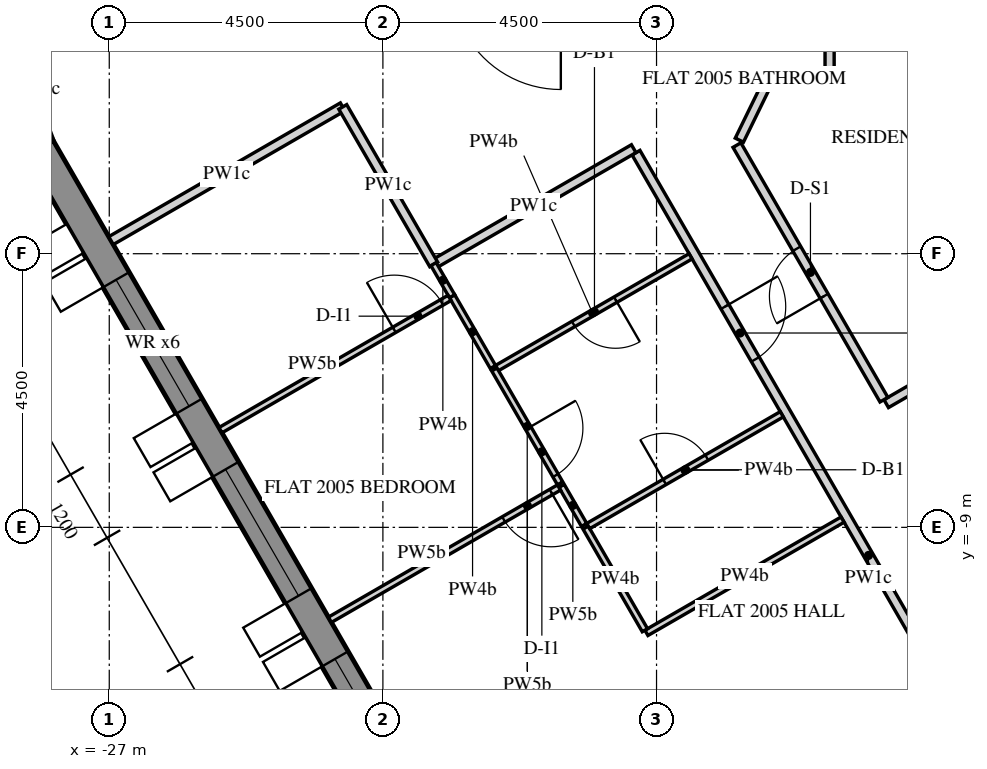
"""IFC4 building model, lengths in metres.
Left out: names, types, materials, properties, quantities, classifications, styles, units other than length and angle.
Written with IfcOpenShell. Run it as: python <this file> out.ifc"""

import sys

from ifc_helpers import new_model, si_unit, direction, frame, frame_2d, origin, place, context, subcontext, project, spatial, polyline, rectangle, outline, extrude, element, fill, save


model = new_model("IFC4")
c1 = context("Model", 3, precision=1e-05, world=origin(), true_north=direction((0.0, 1.0)))
c2 = subcontext(c1, "Body", "Model", "MODEL_VIEW")
j1 = project(units=[si_unit("LENGTHUNIT", "METRE"), si_unit("PLANEANGLEUNIT", "RADIAN")], contexts=[c1])
p1 = place(None, origin())
s1 = spatial("IfcSite", under=j1, at=p1, CompositionType="ELEMENT")
p2 = place(p1, origin())
s2 = spatial("IfcBuilding", under=s1, at=p2, CompositionType="ELEMENT")
p3 = place(p2, frame((0.0, 0.0, 256.2)))
s3 = spatial("IfcBuildingStorey", under=s2, at=p3, CompositionType="ELEMENT", Elevation=256.2)
p4 = place(p3, frame((-28.578, -1.606, 0.0), z_axis=(0.0, 0.0, 1.0), x_axis=(0.352838463023, -0.935684251771, 0.0)))
e1 = element("IfcWall", 1, at=p4, inside=s3, PredefinedType="SOLIDWALL", context=c2, shape_type="SweptSolid", body=[
    extrude(outline(polyline([(-0.041, -0.25), (1.237, -0.25), (1.196, 0.25), (0.041, 0.25), (-0.041, -0.25)])), origin(), (0.0, 0.0, 1.0), 3.75),
])
p5 = place(p3, frame((-28.149, -2.745, 0.0), z_axis=(0.0, 0.0, 1.0), x_axis=(0.500003737743, -0.866023245787, 0.0)))
e2 = element("IfcWall", 2, at=p5, inside=s3, PredefinedType="SOLIDWALL", context=c2, shape_type="SweptSolid", body=[
    extrude(outline(polyline([(-0.021, -0.25), (25.468, -0.25), (25.421, 0.25), (0.021, 0.25), (-0.021, -0.25)])), origin(), (0.0, 0.0, 1.0), 3.75),
])
p6 = place(p5, frame((2.522, 0.0, 0.6)))
e3 = element("IfcOpeningElement", 3, at=p6, cuts=e2, PredefinedType="OPENING", context=c2, shape_type="SweptSolid", body=[
    extrude(rectangle(XDim=2.4, YDim=2.7, at=frame_2d((1.2, 1.35))), frame((0.0, 0.26, 0.0), z_axis=(0.0, -1.0, 0.0), x_axis=(1.0, 0.0, 0.0)), (0.0, 0.0, 1.0), 0.52),
])
p7 = place(p5, frame((6.122, 0.0, 0.6)))
e4 = element("IfcOpeningElement", 4, at=p7, cuts=e2, PredefinedType="OPENING", context=c2, shape_type="SweptSolid", body=[
    extrude(rectangle(XDim=2.4, YDim=2.7, at=frame_2d((1.2, 1.35))), frame((0.0, 0.26, 0.0), z_axis=(0.0, -1.0, 0.0), x_axis=(1.0, 0.0, 0.0)), (0.0, 0.0, 1.0), 0.52),
])
p8 = place(p5, frame((9.722, 0.0, 0.6)))
e5 = element("IfcOpeningElement", 5, at=p8, cuts=e2, PredefinedType="OPENING", context=c2, shape_type="SweptSolid", body=[
    extrude(rectangle(XDim=2.4, YDim=2.7, at=frame_2d((1.2, 1.35))), frame((0.0, 0.26, 0.0), z_axis=(0.0, -1.0, 0.0), x_axis=(1.0, 0.0, 0.0)), (0.0, 0.0, 1.0), 0.52),
])
p9 = place(p5, frame((13.323, 0.0, 0.6)))
e6 = element("IfcOpeningElement", 6, at=p9, cuts=e2, PredefinedType="OPENING", context=c2, shape_type="SweptSolid", body=[
    extrude(rectangle(XDim=2.4, YDim=2.7, at=frame_2d((1.2, 1.35))), frame((0.0, 0.26, 0.0), z_axis=(0.0, -1.0, 0.0), x_axis=(1.0, 0.0, 0.0)), (0.0, 0.0, 1.0), 0.52),
])
p10 = place(p5, frame((16.922, 0.0, 0.6)))
e7 = element("IfcOpeningElement", 7, at=p10, cuts=e2, PredefinedType="OPENING", context=c2, shape_type="SweptSolid", body=[
    extrude(rectangle(XDim=2.4, YDim=2.7, at=frame_2d((1.2, 1.35))), frame((0.0, 0.26, 0.0), z_axis=(0.0, -1.0, 0.0), x_axis=(1.0, 0.0, 0.0)), (0.0, 0.0, 1.0), 0.52),
])
p11 = place(p5, frame((20.522, 0.0, 0.6)))
e8 = element("IfcOpeningElement", 8, at=p11, cuts=e2, PredefinedType="OPENING", context=c2, shape_type="SweptSolid", body=[
    extrude(rectangle(XDim=2.4, YDim=2.7, at=frame_2d((1.2, 1.35))), frame((0.0, 0.26, 0.0), z_axis=(0.0, -1.0, 0.0), x_axis=(1.0, 0.0, 0.0)), (0.0, 0.0, 1.0), 0.52),
])
p12 = place(p3, frame((-18.338, -2.838, 0.0), z_axis=(0.0, 0.0, 1.0), x_axis=(0.499999693481, -0.866025580753, 0.0)))
e9 = element("IfcWall", 9, at=p12, inside=s3, PredefinedType="PARTITIONING", context=c2, shape_type="SweptSolid", body=[
    extrude(rectangle(XDim=15.296, YDim=0.15, at=frame_2d((7.648, 0.0))), origin(), (0.0, 0.0, 1.0), 2.823),
])
p13 = place(p12, frame((2.925, 0.0, 0.0)))
e10 = element("IfcOpeningElement", 10, at=p13, cuts=e9, PredefinedType="OPENING", context=c2, shape_type="SweptSolid", body=[
    extrude(rectangle(XDim=1.0, YDim=2.1, at=frame_2d((0.5, 1.05))), frame((0.0, 0.085, 0.0), z_axis=(0.0, -1.0, 0.0), x_axis=(1.0, 0.0, 0.0)), (0.0, 0.0, 1.0), 0.17),
])
p14 = place(p12, frame((14.136, 0.0, 0.0)))
e11 = element("IfcOpeningElement", 11, at=p14, cuts=e9, PredefinedType="OPENING", context=c2, shape_type="SweptSolid", body=[
    extrude(rectangle(XDim=1.0, YDim=2.1, at=frame_2d((0.5, 1.05))), frame((0.0, 0.085, 0.0), z_axis=(0.0, -1.0, 0.0), x_axis=(1.0, 0.0, 0.0)), (0.0, 0.0, 1.0), 0.17),
])
p15 = place(p3, frame((-21.666, -4.673, 0.0), z_axis=(0.0, 0.0, 1.0), x_axis=(0.86601654697, 0.500015340139, 0.0)))
e12 = element("IfcWall", 12, at=p15, inside=s3, PredefinedType="PARTITIONING", context=c2, shape_type="SweptSolid", body=[
    extrude(rectangle(XDim=3.8, YDim=0.15, at=frame_2d((1.9, 0.0))), origin(), (0.0, 0.0, 1.0), 2.823),
])
p16 = place(p3, frame((-26.971, -4.284, 0.0), z_axis=(0.0, 0.0, 1.0), x_axis=(0.866010893236, 0.500025132165, 0.0)))
e13 = element("IfcWall", 13, at=p16, inside=s3, PredefinedType="PARTITIONING", context=c2, shape_type="SweptSolid", body=[
    extrude(rectangle(XDim=4.399, YDim=0.15, at=frame_2d((2.199, 0.0))), origin(), (0.0, 0.0, 1.0), 2.823),
])
p17 = place(p3, frame((-23.16, -2.085, 0.0), z_axis=(0.0, 0.0, 1.0), x_axis=(0.499983857782, -0.866034723298, 0.0)))
e14 = element("IfcWall", 14, at=p17, inside=s3, PredefinedType="PARTITIONING", context=c2, shape_type="SweptSolid", body=[
    extrude(rectangle(XDim=2.991, YDim=0.15, at=frame_2d((1.496, 0.0))), origin(), (0.0, 0.0, 1.0), 2.823),
])
p18 = place(p3, frame((-10.066, -4.566, 0.0), z_axis=(0.0, 0.0, 1.0), x_axis=(-0.866037363387, -0.499979284789, 0.0)))
e15 = element("IfcWall", 15, at=p18, inside=s3, PredefinedType="PARTITIONING", context=c2, shape_type="SweptSolid", body=[
    extrude(rectangle(XDim=4.8, YDim=0.15, at=frame_2d((2.4, 0.0))), origin(), (0.0, 0.0, 1.0), 2.823),
])
p19 = place(p3, frame((-14.26, -6.901, 0.0), z_axis=(0.0, 0.0, 1.0), x_axis=(-0.499978899972, 0.866037585549, 0.0)))
e16 = element("IfcWall", 16, at=p19, inside=s3, PredefinedType="PARTITIONING", context=c2, shape_type="SweptSolid", body=[
    extrude(rectangle(XDim=4.835, YDim=0.15, at=frame_2d((2.417, 0.0))), origin(), (0.0, 0.0, 1.0), 2.823),
])
p20 = place(p19, frame((1.967, 0.0, 0.0)))
e17 = element("IfcOpeningElement", 17, at=p20, cuts=e16, PredefinedType="OPENING", context=c2, shape_type="SweptSolid", body=[
    extrude(rectangle(XDim=0.9, YDim=2.1, at=frame_2d((0.45, 1.05))), frame((0.0, 0.085, 0.0), z_axis=(0.0, -1.0, 0.0), x_axis=(1.0, 0.0, 0.0)), (0.0, 0.0, 1.0), 0.17),
])
p21 = place(p3, frame((-16.638, -2.632, 0.0), z_axis=(0.0, 0.0, 1.0), x_axis=(0.438437541994, 0.898761660158, 0.0)))
e18 = element("IfcWall", 18, at=p21, inside=s3, PredefinedType="PARTITIONING", context=c2, shape_type="SweptSolid", body=[
    extrude(rectangle(XDim=1.037, YDim=0.15, at=frame_2d((0.519, 0.0))), origin(), (0.0, 0.0, 1.0), 2.823),
])
p22 = place(p3, frame((-16.1, -1.7, 0.0), z_axis=(0.0, 0.0, 1.0), x_axis=(1.0, 0.0, 0.0)))
e19 = element("IfcWall", 19, at=p22, inside=s3, PredefinedType="PARTITIONING", context=c2, shape_type="SweptSolid", body=[
    extrude(rectangle(XDim=0.946, YDim=0.15, at=frame_2d((0.473, 0.0))), origin(), (0.0, 0.0, 1.0), 2.823),
])
p23 = place(p3, frame((-15.154, -1.625, 0.0), z_axis=(0.0, 0.0, 1.0), x_axis=(0.0, 1.0, 0.0)))
e20 = element("IfcWall", 20, at=p23, inside=s3, PredefinedType="PARTITIONING", context=c2, shape_type="SweptSolid", body=[
    extrude(rectangle(XDim=1.425, YDim=0.15, at=frame_2d((0.712, 0.0))), origin(), (0.0, 0.0, 1.0), 2.823),
])
p24 = place(p3, frame((-19.191, -8.96, 0.0), z_axis=(0.0, 0.0, 1.0), x_axis=(-0.500036104519, 0.866004557827, 0.0)))
e21 = element("IfcWall", 21, at=p24, inside=s3, PredefinedType="PARTITIONING", context=c2, shape_type="SweptSolid", body=[
    extrude(rectangle(XDim=0.741, YDim=0.1, at=frame_2d((0.371, 0.0))), origin(), (0.0, 0.0, 1.0), 2.823),
])
p25 = place(p3, frame((-19.604, -8.345, 0.0), z_axis=(0.0, 0.0, 1.0), x_axis=(-0.866027639635, -0.499996127374, 0.0)))
e22 = element("IfcWall", 22, at=p25, inside=s3, PredefinedType="PARTITIONING", context=c2, shape_type="SweptSolid", body=[
    extrude(rectangle(XDim=4.35, YDim=0.1, at=frame_2d((2.175, 0.0))), origin(), (0.0, 0.0, 1.0), 2.823),
])
p26 = place(p25, frame((0.15, 0.0, 0.0)))
e23 = element("IfcOpeningElement", 23, at=p26, cuts=e22, PredefinedType="OPENING", context=c2, shape_type="SweptSolid", body=[
    extrude(rectangle(XDim=0.9, YDim=2.1, at=frame_2d((0.45, 1.05))), frame((0.0, 0.06, 0.0), z_axis=(0.0, -1.0, 0.0), x_axis=(1.0, 0.0, 0.0)), (0.0, 0.0, 1.0), 0.12),
])
p27 = place(p3, frame((-14.94, -8.873, 0.0), z_axis=(0.0, 0.0, 1.0), x_axis=(-0.866056803351, -0.499945610411, 0.0)))
e24 = element("IfcWall", 24, at=p27, inside=s3, PredefinedType="PARTITIONING", context=c2, shape_type="SweptSolid", body=[
    extrude(rectangle(XDim=3.725, YDim=0.1, at=frame_2d((1.863, 0.0))), origin(), (0.0, 0.0, 1.0), 2.823),
])
p28 = place(p3, frame((-18.191, -10.692, 0.0), z_axis=(0.0, 0.0, 1.0), x_axis=(-0.500043961785, 0.866000020948, 0.0)))
e25 = element("IfcWall", 25, at=p28, inside=s3, PredefinedType="PARTITIONING", context=c2, shape_type="SweptSolid", body=[
    extrude(rectangle(XDim=1.95, YDim=0.1, at=frame_2d((0.975, 0.0))), origin(), (0.0, 0.0, 1.0), 2.823),
])
p29 = place(p3, frame((-17.44, -4.542, 0.0), z_axis=(0.0, 0.0, 1.0), x_axis=(-0.866028424924, -0.499994767197, 0.0)))
e26 = element("IfcWall", 26, at=p29, inside=s3, PredefinedType="PARTITIONING", context=c2, shape_type="SweptSolid", body=[
    extrude(rectangle(XDim=3.725, YDim=0.1, at=frame_2d((1.863, 0.0))), origin(), (0.0, 0.0, 1.0), 2.823),
])
p30 = place(p29, frame((1.425, 0.0, 0.0)))
e27 = element("IfcOpeningElement", 27, at=p30, cuts=e26, PredefinedType="OPENING", context=c2, shape_type="SweptSolid", body=[
    extrude(rectangle(XDim=0.8, YDim=2.1, at=frame_2d((0.4, 1.05))), frame((0.0, 0.06, 0.0), z_axis=(0.0, -1.0, 0.0), x_axis=(1.0, 0.0, 0.0)), (0.0, 0.0, 1.0), 0.12),
])
p31 = place(p3, frame((-20.667, -6.403, 0.0), z_axis=(0.0, 0.0, 1.0), x_axis=(0.499999270699, -0.866025824846, 0.0)))
e28 = element("IfcWall", 28, at=p31, inside=s3, PredefinedType="PARTITIONING", context=c2, shape_type="SweptSolid", body=[
    extrude(rectangle(XDim=2.163, YDim=0.1, at=frame_2d((1.082, 0.0))), origin(), (0.0, 0.0, 1.0), 2.823),
])
p32 = place(p31, frame((1.113, 0.0, 0.0)))
e29 = element("IfcOpeningElement", 29, at=p32, cuts=e28, PredefinedType="OPENING", context=c2, shape_type="SweptSolid", body=[
    extrude(rectangle(XDim=0.9, YDim=2.1, at=frame_2d((0.45, 1.05))), frame((0.0, 0.06, 0.0), z_axis=(0.0, -1.0, 0.0), x_axis=(1.0, 0.0, 0.0)), (0.0, 0.0, 1.0), 0.12),
])
p33 = place(p3, frame((-19.123, -8.978, 0.0), z_axis=(0.0, 0.0, 1.0), x_axis=(0.866006363297, 0.500032977642, 0.0)))
e30 = element("IfcWall", 30, at=p33, inside=s3, PredefinedType="PARTITIONING", context=c2, shape_type="SweptSolid", body=[
    extrude(rectangle(XDim=3.675, YDim=0.1, at=frame_2d((1.837, 0.0))), origin(), (0.0, 0.0, 1.0), 2.823),
])
p34 = place(p33, frame((1.45, 0.0, 0.0)))
e31 = element("IfcOpeningElement", 31, at=p34, cuts=e30, PredefinedType="OPENING", context=c2, shape_type="SweptSolid", body=[
    extrude(rectangle(XDim=0.8, YDim=2.1, at=frame_2d((0.4, 1.05))), frame((0.0, 0.06, 0.0), z_axis=(0.0, -1.0, 0.0), x_axis=(1.0, 0.0, 0.0)), (0.0, 0.0, 1.0), 0.12),
])
p35 = place(p3, frame((-21.667, -4.671, 0.0), z_axis=(0.0, 0.0, 1.0), x_axis=(0.499952348839, -0.866052913447, 0.0)))
e32 = element("IfcWall", 32, at=p35, inside=s3, PredefinedType="PARTITIONING", context=c2, shape_type="SweptSolid", body=[
    extrude(rectangle(XDim=0.613, YDim=0.1, at=frame_2d((0.306, 0.0))), origin(), (0.0, 0.0, 1.0), 2.823),
])
p36 = place(p3, frame((-21.361, -5.202, 0.0), z_axis=(0.0, 0.0, 1.0), x_axis=(0.500074377092, -0.865982457891, 0.0)))
e33 = element("IfcWall", 33, at=p36, inside=s3, PredefinedType="PARTITIONING", context=c2, shape_type="SweptSolid", body=[
    extrude(rectangle(XDim=1.341, YDim=0.1, at=frame_2d((0.67, 0.0))), origin(), (0.0, 0.0, 1.0), 2.823),
])
p37 = place(p3, frame((-25.171, -7.402, 0.0), z_axis=(0.0, 0.0, 1.0), x_axis=(0.866013608182, 0.500020430026, 0.0)))
e34 = element("IfcWall", 34, at=p37, inside=s3, PredefinedType="PARTITIONING", context=c2, shape_type="SweptSolid", body=[
    extrude(rectangle(XDim=4.35, YDim=0.1, at=frame_2d((2.175, 0.0))), origin(), (0.0, 0.0, 1.0), 2.823),
])
p38 = place(p37, frame((3.3, 0.0, 0.0)))
e35 = element("IfcOpeningElement", 35, at=p38, cuts=e34, PredefinedType="OPENING", context=c2, shape_type="SweptSolid", body=[
    extrude(rectangle(XDim=0.9, YDim=2.1, at=frame_2d((0.45, 1.05))), frame((0.0, 0.06, 0.0), z_axis=(0.0, -1.0, 0.0), x_axis=(1.0, 0.0, 0.0)), (0.0, 0.0, 1.0), 0.12),
])
p39 = place(p6, frame((0.0, 0.18, 0.0)))
e36 = element("IfcWindow", 36, at=p39, inside=s3, PartitioningType="DOUBLE_PANEL_VERTICAL", PredefinedType="WINDOW", context=c2, shape_type="SweptSolid", body=[
    extrude(rectangle(XDim=2.4, YDim=2.7, at=frame_2d((1.2, 1.35))), frame((0.0, 0.03, 0.0), z_axis=(0.0, -1.0, 0.0), x_axis=(1.0, 0.0, 0.0)), (0.0, 0.0, 1.0), 0.06),
])
fill(e3, e36)
p40 = place(p7, frame((0.0, 0.18, 0.0)))
e37 = element("IfcWindow", 37, at=p40, inside=s3, PartitioningType="DOUBLE_PANEL_VERTICAL", PredefinedType="WINDOW", context=c2, shape_type="SweptSolid", body=[
    extrude(rectangle(XDim=2.4, YDim=2.7, at=frame_2d((1.2, 1.35))), frame((0.0, 0.03, 0.0), z_axis=(0.0, -1.0, 0.0), x_axis=(1.0, 0.0, 0.0)), (0.0, 0.0, 1.0), 0.06),
])
fill(e4, e37)
p41 = place(p8, frame((0.0, 0.18, 0.0)))
e38 = element("IfcWindow", 38, at=p41, inside=s3, PartitioningType="DOUBLE_PANEL_VERTICAL", PredefinedType="WINDOW", context=c2, shape_type="SweptSolid", body=[
    extrude(rectangle(XDim=2.4, YDim=2.7, at=frame_2d((1.2, 1.35))), frame((0.0, 0.03, 0.0), z_axis=(0.0, -1.0, 0.0), x_axis=(1.0, 0.0, 0.0)), (0.0, 0.0, 1.0), 0.06),
])
fill(e5, e38)
p42 = place(p13, origin())
e39 = element("IfcDoor", 39, at=p42, inside=s3, OperationType="SINGLE_SWING_RIGHT", PredefinedType="DOOR", context=c2, shape_type="SweptSolid", body=[
    extrude(rectangle(XDim=1.0, YDim=2.1, at=frame_2d((0.5, 1.05))), frame((0.0, 0.025, 0.0), z_axis=(0.0, -1.0, 0.0), x_axis=(1.0, 0.0, 0.0)), (0.0, 0.0, 1.0), 0.05),
])
fill(e10, e39)
p43 = place(p30, origin())
e40 = element("IfcDoor", 40, at=p43, inside=s3, OperationType="SINGLE_SWING_RIGHT", PredefinedType="DOOR", context=c2, shape_type="SweptSolid", body=[
    extrude(rectangle(XDim=0.8, YDim=2.1, at=frame_2d((0.4, 1.05))), frame((0.0, 0.025, 0.0), z_axis=(0.0, -1.0, 0.0), x_axis=(1.0, 0.0, 0.0)), (0.0, 0.0, 1.0), 0.05),
])
fill(e27, e40)
p44 = place(p32, origin())
e41 = element("IfcDoor", 41, at=p44, inside=s3, OperationType="SINGLE_SWING_RIGHT", PredefinedType="DOOR", context=c2, shape_type="SweptSolid", body=[
    extrude(rectangle(XDim=0.9, YDim=2.1, at=frame_2d((0.45, 1.05))), frame((0.0, 0.025, 0.0), z_axis=(0.0, -1.0, 0.0), x_axis=(1.0, 0.0, 0.0)), (0.0, 0.0, 1.0), 0.05),
])
fill(e29, e41)
p45 = place(p38, origin())
e42 = element("IfcDoor", 42, at=p45, inside=s3, OperationType="SINGLE_SWING_RIGHT", PredefinedType="DOOR", context=c2, shape_type="SweptSolid", body=[
    extrude(rectangle(XDim=0.9, YDim=2.1, at=frame_2d((0.45, 1.05))), frame((0.0, 0.025, 0.0), z_axis=(0.0, -1.0, 0.0), x_axis=(1.0, 0.0, 0.0)), (0.0, 0.0, 1.0), 0.05),
])
fill(e35, e42)
p46 = place(p26, origin())
e43 = element("IfcDoor", 43, at=p46, inside=s3, OperationType="SINGLE_SWING_RIGHT", PredefinedType="DOOR", context=c2, shape_type="SweptSolid", body=[
    extrude(rectangle(XDim=0.9, YDim=2.1, at=frame_2d((0.45, 1.05))), frame((0.0, 0.025, 0.0), z_axis=(0.0, -1.0, 0.0), x_axis=(1.0, 0.0, 0.0)), (0.0, 0.0, 1.0), 0.05),
])
fill(e23, e43)
p47 = place(p34, origin())
e44 = element("IfcDoor", 44, at=p47, inside=s3, OperationType="SINGLE_SWING_LEFT", PredefinedType="DOOR", context=c2, shape_type="SweptSolid", body=[
    extrude(rectangle(XDim=0.8, YDim=2.1, at=frame_2d((0.4, 1.05))), frame((0.0, 0.025, 0.0), z_axis=(0.0, -1.0, 0.0), x_axis=(1.0, 0.0, 0.0)), (0.0, 0.0, 1.0), 0.05),
])
fill(e31, e44)
p48 = place(p20, origin())
e45 = element("IfcDoor", 45, at=p48, inside=s3, OperationType="SINGLE_SWING_RIGHT", PredefinedType="DOOR", context=c2, shape_type="SweptSolid", body=[
    extrude(rectangle(XDim=0.9, YDim=2.1, at=frame_2d((0.45, 1.05))), frame((0.0, 0.025, 0.0), z_axis=(0.0, -1.0, 0.0), x_axis=(1.0, 0.0, 0.0)), (0.0, 0.0, 1.0), 0.05),
])
fill(e17, e45)
save(model, sys.argv[1])
